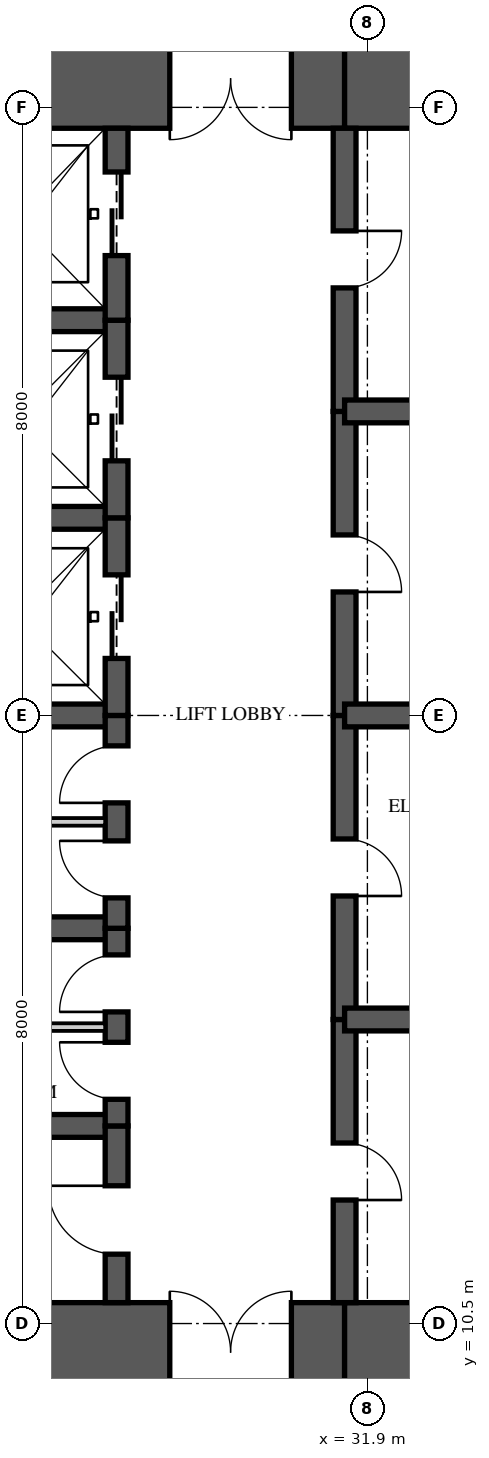
"""IFC4 building model, lengths in metres.
Left out: names, types, materials, properties, quantities, classifications, styles, units other than length and angle.
Written with IfcOpenShell. Run it as: python <this file> out.ifc"""

import sys

from ifc_helpers import new_model, si_unit, direction, frame, frame_2d, origin, place, context, subcontext, project, spatial, rectangle, extrude, element, fill, save


model = new_model("IFC4")
c1 = context("Model", 3, precision=1e-05, world=origin(), true_north=direction((0.0, 1.0)))
c2 = subcontext(c1, "Body", "Model", "MODEL_VIEW")
j1 = project(units=[si_unit("LENGTHUNIT", "METRE"), si_unit("PLANEANGLEUNIT", "RADIAN")], contexts=[c1])
p1 = place(None, origin())
s1 = spatial("IfcSite", under=j1, at=p1, CompositionType="ELEMENT")
p2 = place(p1, origin())
s2 = spatial("IfcBuilding", under=s1, at=p2, CompositionType="ELEMENT")
p3 = place(p2, frame((0.0, 0.0, 194.55)))
s3 = spatial("IfcBuildingStorey", under=s2, at=p3, CompositionType="ELEMENT", Elevation=194.55)
p4 = place(p3, frame((26.0, 10.125, 0.0), z_axis=(0.0, 0.0, 1.0), x_axis=(1.0, 0.0, 0.0)))
e1 = element("IfcWall", 1, at=p4, inside=s3, PredefinedType="SHEAR", context=c2, shape_type="SweptSolid", body=[
    extrude(rectangle(XDim=5.6, YDim=1.3, at=frame_2d((2.8, 0.0))), origin(), (0.0, 0.0, 1.0), 3.35),
])
p5 = place(p4, frame((3.3, 0.0, 0.0)))
e2 = element("IfcOpeningElement", 2, at=p5, cuts=e1, PredefinedType="OPENING", context=c2, shape_type="SweptSolid", body=[
    extrude(rectangle(XDim=1.6, YDim=2.1, at=frame_2d((0.8, 1.05))), frame((0.0, 0.66, 0.0), z_axis=(0.0, -1.0, 0.0), x_axis=(1.0, 0.0, 0.0)), (0.0, 0.0, 1.0), 1.32),
])
for number, where, z_axis, x_axis in (
    (3, (31.6, 10.125, 0.0), (0.0, 0.0, 1.0), (1.0, 0.0, 0.0)),
    (4, (35.9, 26.875, 0.0), (0.0, 0.0, 1.0), (-1.0, 0.0, 0.0)),
):
    element("IfcWall", number, at=place(p3, frame(where, z_axis=z_axis, x_axis=x_axis)), inside=s3, PredefinedType="SHEAR", context=c2, shape_type="SweptSolid", body=[
        extrude(rectangle(XDim=4.3, YDim=1.3, at=frame_2d((2.15, 0.0))), origin(), (0.0, 0.0, 1.0), 3.35),
    ])
p6 = place(p3, frame((31.6, 26.875, 0.0), z_axis=(0.0, 0.0, 1.0), x_axis=(-1.0, 0.0, 0.0)))
e5 = element("IfcWall", 5, at=p6, inside=s3, PredefinedType="SHEAR", context=c2, shape_type="SweptSolid", body=[
    extrude(rectangle(XDim=5.6, YDim=1.3, at=frame_2d((2.8, 0.0))), origin(), (0.0, 0.0, 1.0), 3.35),
])
p7 = place(p6, frame((0.7, 0.0, 0.0)))
e6 = element("IfcOpeningElement", 6, at=p7, cuts=e5, PredefinedType="OPENING", context=c2, shape_type="SweptSolid", body=[
    extrude(rectangle(XDim=1.6, YDim=2.1, at=frame_2d((0.8, 1.05))), frame((0.0, 0.66, 0.0), z_axis=(0.0, -1.0, 0.0), x_axis=(1.0, 0.0, 0.0)), (0.0, 0.0, 1.0), 1.32),
])
p8 = place(p3, frame((28.6, 10.775, 0.0), z_axis=(0.0, 0.0, 1.0), x_axis=(0.0, 1.0, 0.0)))
e7 = element("IfcWall", 7, at=p8, inside=s3, PredefinedType="SHEAR", context=c2, shape_type="SweptSolid", body=[
    extrude(rectangle(XDim=2.325, YDim=0.3, at=frame_2d((1.163, 0.0))), origin(), (0.0, 0.0, 1.0), 3.35),
])
p9 = place(p8, frame((0.637, 0.0, 0.0)))
e8 = element("IfcOpeningElement", 8, at=p9, cuts=e7, PredefinedType="OPENING", context=c2, shape_type="SweptSolid", body=[
    extrude(rectangle(XDim=0.9, YDim=2.1, at=frame_2d((0.45, 1.05))), frame((0.0, 0.16, 0.0), z_axis=(0.0, -1.0, 0.0), x_axis=(1.0, 0.0, 0.0)), (0.0, 0.0, 1.0), 0.32),
])
p10 = place(p3, frame((28.6, 13.1, 0.0), z_axis=(0.0, 0.0, 1.0), x_axis=(0.0, 1.0, 0.0)))
e9 = element("IfcWall", 9, at=p10, inside=s3, PredefinedType="SHEAR", context=c2, shape_type="SweptSolid", body=[
    extrude(rectangle(XDim=2.6, YDim=0.3, at=frame_2d((1.3, 0.0))), origin(), (0.0, 0.0, 1.0), 3.35),
])
p11 = place(p10, frame((0.35, 0.0, 0.0)))
e10 = element("IfcOpeningElement", 10, at=p11, cuts=e9, PredefinedType="OPENING", context=c2, shape_type="SweptSolid", body=[
    extrude(rectangle(XDim=0.75, YDim=2.1, at=frame_2d((0.375, 1.05))), frame((0.0, 0.16, 0.0), z_axis=(0.0, -1.0, 0.0), x_axis=(1.0, 0.0, 0.0)), (0.0, 0.0, 1.0), 0.32),
])
p12 = place(p10, frame((1.5, 0.0, 0.0)))
e11 = element("IfcOpeningElement", 11, at=p12, cuts=e9, PredefinedType="OPENING", context=c2, shape_type="SweptSolid", body=[
    extrude(rectangle(XDim=0.75, YDim=2.1, at=frame_2d((0.375, 1.05))), frame((0.0, 0.16, 0.0), z_axis=(0.0, -1.0, 0.0), x_axis=(1.0, 0.0, 0.0)), (0.0, 0.0, 1.0), 0.32),
])
p13 = place(p3, frame((28.6, 15.7, 0.0), z_axis=(0.0, 0.0, 1.0), x_axis=(0.0, 1.0, 0.0)))
e12 = element("IfcWall", 12, at=p13, inside=s3, PredefinedType="SHEAR", context=c2, shape_type="SweptSolid", body=[
    extrude(rectangle(XDim=2.8, YDim=0.3, at=frame_2d((1.4, 0.0))), origin(), (0.0, 0.0, 1.0), 3.35),
])
p14 = place(p13, frame((0.4, 0.0, 0.0)))
e13 = element("IfcOpeningElement", 13, at=p14, cuts=e12, PredefinedType="OPENING", context=c2, shape_type="SweptSolid", body=[
    extrude(rectangle(XDim=0.75, YDim=2.1, at=frame_2d((0.375, 1.05))), frame((0.0, 0.16, 0.0), z_axis=(0.0, -1.0, 0.0), x_axis=(1.0, 0.0, 0.0)), (0.0, 0.0, 1.0), 0.32),
])
p15 = place(p13, frame((1.65, 0.0, 0.0)))
e14 = element("IfcOpeningElement", 14, at=p15, cuts=e12, PredefinedType="OPENING", context=c2, shape_type="SweptSolid", body=[
    extrude(rectangle(XDim=0.75, YDim=2.1, at=frame_2d((0.375, 1.05))), frame((0.0, 0.16, 0.0), z_axis=(0.0, -1.0, 0.0), x_axis=(1.0, 0.0, 0.0)), (0.0, 0.0, 1.0), 0.32),
])
p16 = place(p3, frame((28.6, 18.5, 0.0), z_axis=(0.0, 0.0, 1.0), x_axis=(0.0, 1.0, 0.0)))
e15 = element("IfcWall", 15, at=p16, inside=s3, PredefinedType="SHEAR", context=c2, shape_type="SweptSolid", body=[
    extrude(rectangle(XDim=2.6, YDim=0.3, at=frame_2d((1.3, 0.0))), origin(), (0.0, 0.0, 1.0), 3.35),
])
p17 = place(p16, frame((0.75, 0.0, 0.0)))
e16 = element("IfcOpeningElement", 16, at=p17, cuts=e15, PredefinedType="OPENING", context=c2, shape_type="SweptSolid", body=[
    extrude(rectangle(XDim=1.1, YDim=2.1, at=frame_2d((0.55, 1.05))), frame((0.0, 0.16, 0.0), z_axis=(0.0, -1.0, 0.0), x_axis=(1.0, 0.0, 0.0)), (0.0, 0.0, 1.0), 0.32),
])
p18 = place(p3, frame((28.6, 21.1, 0.0), z_axis=(0.0, 0.0, 1.0), x_axis=(0.0, 1.0, 0.0)))
e17 = element("IfcWall", 17, at=p18, inside=s3, PredefinedType="SHEAR", context=c2, shape_type="SweptSolid", body=[
    extrude(rectangle(XDim=2.6, YDim=0.3, at=frame_2d((1.3, 0.0))), origin(), (0.0, 0.0, 1.0), 3.35),
])
p19 = place(p18, frame((0.75, 0.0, 0.0)))
e18 = element("IfcOpeningElement", 18, at=p19, cuts=e17, PredefinedType="OPENING", context=c2, shape_type="SweptSolid", body=[
    extrude(rectangle(XDim=1.1, YDim=2.1, at=frame_2d((0.55, 1.05))), frame((0.0, 0.16, 0.0), z_axis=(0.0, -1.0, 0.0), x_axis=(1.0, 0.0, 0.0)), (0.0, 0.0, 1.0), 0.32),
])
p20 = place(p3, frame((28.6, 23.7, 0.0), z_axis=(0.0, 0.0, 1.0), x_axis=(0.0, 1.0, 0.0)))
e19 = element("IfcWall", 19, at=p20, inside=s3, PredefinedType="SHEAR", context=c2, shape_type="SweptSolid", body=[
    extrude(rectangle(XDim=2.525, YDim=0.3, at=frame_2d((1.263, 0.0))), origin(), (0.0, 0.0, 1.0), 3.35),
])
p21 = place(p20, frame((0.85, 0.0, 0.0)))
e20 = element("IfcOpeningElement", 20, at=p21, cuts=e19, PredefinedType="OPENING", context=c2, shape_type="SweptSolid", body=[
    extrude(rectangle(XDim=1.1, YDim=2.1, at=frame_2d((0.55, 1.05))), frame((0.0, 0.16, 0.0), z_axis=(0.0, -1.0, 0.0), x_axis=(1.0, 0.0, 0.0)), (0.0, 0.0, 1.0), 0.32),
])
p22 = place(p3, frame((31.6, 10.775, 0.0), z_axis=(0.0, 0.0, 1.0), x_axis=(0.0, 1.0, 0.0)))
e21 = element("IfcWall", 21, at=p22, inside=s3, PredefinedType="SHEAR", context=c2, shape_type="SweptSolid", body=[
    extrude(rectangle(XDim=3.725, YDim=0.3, at=frame_2d((1.863, 0.0))), origin(), (0.0, 0.0, 1.0), 3.35),
])
p23 = place(p22, frame((1.35, 0.0, 0.0)))
e22 = element("IfcOpeningElement", 22, at=p23, cuts=e21, PredefinedType="OPENING", context=c2, shape_type="SweptSolid", body=[
    extrude(rectangle(XDim=0.75, YDim=2.1, at=frame_2d((0.375, 1.05))), frame((0.0, 0.16, 0.0), z_axis=(0.0, -1.0, 0.0), x_axis=(1.0, 0.0, 0.0)), (0.0, 0.0, 1.0), 0.32),
])
p24 = place(p3, frame((31.6, 14.5, 0.0), z_axis=(0.0, 0.0, 1.0), x_axis=(0.0, 1.0, 0.0)))
e23 = element("IfcWall", 23, at=p24, inside=s3, PredefinedType="SHEAR", context=c2, shape_type="SweptSolid", body=[
    extrude(rectangle(XDim=4.0, YDim=0.3, at=frame_2d((2.0, 0.0))), origin(), (0.0, 0.0, 1.0), 3.35),
])
p25 = place(p24, frame((1.625, 0.0, 0.0)))
e24 = element("IfcOpeningElement", 24, at=p25, cuts=e23, PredefinedType="OPENING", context=c2, shape_type="SweptSolid", body=[
    extrude(rectangle(XDim=0.75, YDim=2.1, at=frame_2d((0.375, 1.05))), frame((0.0, 0.16, 0.0), z_axis=(0.0, -1.0, 0.0), x_axis=(1.0, 0.0, 0.0)), (0.0, 0.0, 1.0), 0.32),
])
p26 = place(p3, frame((31.6, 18.5, 0.0), z_axis=(0.0, 0.0, 1.0), x_axis=(0.0, 1.0, 0.0)))
e25 = element("IfcWall", 25, at=p26, inside=s3, PredefinedType="SHEAR", context=c2, shape_type="SweptSolid", body=[
    extrude(rectangle(XDim=4.0, YDim=0.3, at=frame_2d((2.0, 0.0))), origin(), (0.0, 0.0, 1.0), 3.35),
])
p27 = place(p26, frame((1.625, 0.0, 0.0)))
e26 = element("IfcOpeningElement", 26, at=p27, cuts=e25, PredefinedType="OPENING", context=c2, shape_type="SweptSolid", body=[
    extrude(rectangle(XDim=0.75, YDim=2.1, at=frame_2d((0.375, 1.05))), frame((0.0, 0.16, 0.0), z_axis=(0.0, -1.0, 0.0), x_axis=(1.0, 0.0, 0.0)), (0.0, 0.0, 1.0), 0.32),
])
p28 = place(p3, frame((31.6, 22.5, 0.0), z_axis=(0.0, 0.0, 1.0), x_axis=(0.0, 1.0, 0.0)))
e27 = element("IfcWall", 27, at=p28, inside=s3, PredefinedType="SHEAR", context=c2, shape_type="SweptSolid", body=[
    extrude(rectangle(XDim=3.725, YDim=0.3, at=frame_2d((1.863, 0.0))), origin(), (0.0, 0.0, 1.0), 3.35),
])
p29 = place(p28, frame((1.625, 0.0, 0.0)))
e28 = element("IfcOpeningElement", 28, at=p29, cuts=e27, PredefinedType="OPENING", context=c2, shape_type="SweptSolid", body=[
    extrude(rectangle(XDim=0.75, YDim=2.1, at=frame_2d((0.375, 1.05))), frame((0.0, 0.16, 0.0), z_axis=(0.0, -1.0, 0.0), x_axis=(1.0, 0.0, 0.0)), (0.0, 0.0, 1.0), 0.32),
])
for number, where, z_axis, x_axis in (
    (29, (26.0, 13.1, 0.0), (0.0, 0.0, 1.0), (1.0, 0.0, 0.0)),
    (30, (26.0, 15.7, 0.0), (0.0, 0.0, 1.0), (1.0, 0.0, 0.0)),
    (31, (26.0, 18.5, 0.0), (0.0, 0.0, 1.0), (1.0, 0.0, 0.0)),
    (32, (26.0, 21.1, 0.0), (0.0, 0.0, 1.0), (1.0, 0.0, 0.0)),
    (33, (26.0, 23.7, 0.0), (0.0, 0.0, 1.0), (1.0, 0.0, 0.0)),
):
    element("IfcWall", number, at=place(p3, frame(where, z_axis=z_axis, x_axis=x_axis)), inside=s3, PredefinedType="SHEAR", context=c2, shape_type="SweptSolid", body=[
        extrude(rectangle(XDim=2.6, YDim=0.3, at=frame_2d((1.3, 0.0))), origin(), (0.0, 0.0, 1.0), 3.35),
    ])
for number, where, z_axis, x_axis in (
    (34, (31.6, 14.5, 0.0), (0.0, 0.0, 1.0), (1.0, 0.0, 0.0)),
    (35, (31.6, 18.5, 0.0), (0.0, 0.0, 1.0), (1.0, 0.0, 0.0)),
    (36, (31.6, 22.5, 0.0), (0.0, 0.0, 1.0), (1.0, 0.0, 0.0)),
):
    element("IfcWall", number, at=place(p3, frame(where, z_axis=z_axis, x_axis=x_axis)), inside=s3, PredefinedType="SHEAR", context=c2, shape_type="SweptSolid", body=[
        extrude(rectangle(XDim=4.3, YDim=0.3, at=frame_2d((2.15, 0.0))), origin(), (0.0, 0.0, 1.0), 3.35),
    ])
for number, where, z_axis, x_axis in (
    (37, (26.15, 14.4, 0.0), (0.0, 0.0, 1.0), (1.0, 0.0, 0.0)),
    (38, (26.15, 17.1, 0.0), (0.0, 0.0, 1.0), (1.0, 0.0, 0.0)),
):
    element("IfcWall", number, at=place(p3, frame(where, z_axis=z_axis, x_axis=x_axis)), inside=s3, PredefinedType="PARTITIONING", context=c2, shape_type="SweptSolid", body=[
        extrude(rectangle(XDim=2.3, YDim=0.1, at=frame_2d((1.15, 0.0))), origin(), (0.0, 0.0, 1.0), 3.11),
    ])
p30 = place(p17, origin())
e39 = element("IfcDoor", 39, at=p30, inside=s3, OperationType="SLIDING_TO_LEFT", PredefinedType="DOOR", context=c2, shape_type="SweptSolid", body=[
    extrude(rectangle(XDim=1.1, YDim=2.1, at=frame_2d((0.55, 1.05))), frame((0.0, 0.025, 0.0), z_axis=(0.0, -1.0, 0.0), x_axis=(1.0, 0.0, 0.0)), (0.0, 0.0, 1.0), 0.05),
])
fill(e16, e39)
p31 = place(p19, origin())
e40 = element("IfcDoor", 40, at=p31, inside=s3, OperationType="SLIDING_TO_LEFT", PredefinedType="DOOR", context=c2, shape_type="SweptSolid", body=[
    extrude(rectangle(XDim=1.1, YDim=2.1, at=frame_2d((0.55, 1.05))), frame((0.0, 0.025, 0.0), z_axis=(0.0, -1.0, 0.0), x_axis=(1.0, 0.0, 0.0)), (0.0, 0.0, 1.0), 0.05),
])
fill(e18, e40)
p32 = place(p21, origin())
e41 = element("IfcDoor", 41, at=p32, inside=s3, OperationType="SLIDING_TO_LEFT", PredefinedType="DOOR", context=c2, shape_type="SweptSolid", body=[
    extrude(rectangle(XDim=1.1, YDim=2.1, at=frame_2d((0.55, 1.05))), frame((0.0, 0.025, 0.0), z_axis=(0.0, -1.0, 0.0), x_axis=(1.0, 0.0, 0.0)), (0.0, 0.0, 1.0), 0.05),
])
fill(e20, e41)
p33 = place(p9, origin())
e42 = element("IfcDoor", 42, at=p33, inside=s3, OperationType="SINGLE_SWING_RIGHT", PredefinedType="DOOR", context=c2, shape_type="SweptSolid", body=[
    extrude(rectangle(XDim=0.9, YDim=2.1, at=frame_2d((0.45, 1.05))), frame((0.0, 0.025, 0.0), z_axis=(0.0, -1.0, 0.0), x_axis=(1.0, 0.0, 0.0)), (0.0, 0.0, 1.0), 0.05),
])
fill(e8, e42)
p34 = place(p11, origin())
e43 = element("IfcDoor", 43, at=p34, inside=s3, OperationType="SINGLE_SWING_RIGHT", PredefinedType="DOOR", context=c2, shape_type="SweptSolid", body=[
    extrude(rectangle(XDim=0.75, YDim=2.1, at=frame_2d((0.375, 1.05))), frame((0.0, 0.025, 0.0), z_axis=(0.0, -1.0, 0.0), x_axis=(1.0, 0.0, 0.0)), (0.0, 0.0, 1.0), 0.05),
])
fill(e10, e43)
p35 = place(p12, origin())
e44 = element("IfcDoor", 44, at=p35, inside=s3, OperationType="SINGLE_SWING_LEFT", PredefinedType="DOOR", context=c2, shape_type="SweptSolid", body=[
    extrude(rectangle(XDim=0.75, YDim=2.1, at=frame_2d((0.375, 1.05))), frame((0.0, 0.025, 0.0), z_axis=(0.0, -1.0, 0.0), x_axis=(1.0, 0.0, 0.0)), (0.0, 0.0, 1.0), 0.05),
])
fill(e11, e44)
p36 = place(p14, origin())
e45 = element("IfcDoor", 45, at=p36, inside=s3, OperationType="SINGLE_SWING_RIGHT", PredefinedType="DOOR", context=c2, shape_type="SweptSolid", body=[
    extrude(rectangle(XDim=0.75, YDim=2.1, at=frame_2d((0.375, 1.05))), frame((0.0, 0.025, 0.0), z_axis=(0.0, -1.0, 0.0), x_axis=(1.0, 0.0, 0.0)), (0.0, 0.0, 1.0), 0.05),
])
fill(e13, e45)
p37 = place(p15, origin())
e46 = element("IfcDoor", 46, at=p37, inside=s3, OperationType="SINGLE_SWING_LEFT", PredefinedType="DOOR", context=c2, shape_type="SweptSolid", body=[
    extrude(rectangle(XDim=0.75, YDim=2.1, at=frame_2d((0.375, 1.05))), frame((0.0, 0.025, 0.0), z_axis=(0.0, -1.0, 0.0), x_axis=(1.0, 0.0, 0.0)), (0.0, 0.0, 1.0), 0.05),
])
fill(e14, e46)
p38 = place(p5, origin())
e47 = element("IfcDoor", 47, at=p38, inside=s3, OperationType="DOUBLE_DOOR_SINGLE_SWING", PredefinedType="DOOR", context=c2, shape_type="SweptSolid", body=[
    extrude(rectangle(XDim=1.6, YDim=2.1, at=frame_2d((0.8, 1.05))), frame((0.0, 0.025, 0.0), z_axis=(0.0, -1.0, 0.0), x_axis=(1.0, 0.0, 0.0)), (0.0, 0.0, 1.0), 0.05),
])
fill(e2, e47)
p39 = place(p7, origin())
e48 = element("IfcDoor", 48, at=p39, inside=s3, OperationType="DOUBLE_DOOR_SINGLE_SWING", PredefinedType="DOOR", context=c2, shape_type="SweptSolid", body=[
    extrude(rectangle(XDim=1.6, YDim=2.1, at=frame_2d((0.8, 1.05))), frame((0.0, 0.025, 0.0), z_axis=(0.0, -1.0, 0.0), x_axis=(1.0, 0.0, 0.0)), (0.0, 0.0, 1.0), 0.05),
])
fill(e6, e48)
p40 = place(p23, frame((0.75, 0.0, 0.0), z_axis=(0.0, 0.0, 1.0), x_axis=(-1.0, 0.0, 0.0)))
e49 = element("IfcDoor", 49, at=p40, inside=s3, OperationType="SINGLE_SWING_RIGHT", PredefinedType="DOOR", context=c2, shape_type="SweptSolid", body=[
    extrude(rectangle(XDim=0.75, YDim=2.1, at=frame_2d((0.375, 1.05))), frame((0.0, 0.025, 0.0), z_axis=(0.0, -1.0, 0.0), x_axis=(1.0, 0.0, 0.0)), (0.0, 0.0, 1.0), 0.05),
])
fill(e22, e49)
p41 = place(p25, frame((0.75, 0.0, 0.0), z_axis=(0.0, 0.0, 1.0), x_axis=(-1.0, 0.0, 0.0)))
e50 = element("IfcDoor", 50, at=p41, inside=s3, OperationType="SINGLE_SWING_RIGHT", PredefinedType="DOOR", context=c2, shape_type="SweptSolid", body=[
    extrude(rectangle(XDim=0.75, YDim=2.1, at=frame_2d((0.375, 1.05))), frame((0.0, 0.025, 0.0), z_axis=(0.0, -1.0, 0.0), x_axis=(1.0, 0.0, 0.0)), (0.0, 0.0, 1.0), 0.05),
])
fill(e24, e50)
p42 = place(p27, frame((0.75, 0.0, 0.0), z_axis=(0.0, 0.0, 1.0), x_axis=(-1.0, 0.0, 0.0)))
e51 = element("IfcDoor", 51, at=p42, inside=s3, OperationType="SINGLE_SWING_RIGHT", PredefinedType="DOOR", context=c2, shape_type="SweptSolid", body=[
    extrude(rectangle(XDim=0.75, YDim=2.1, at=frame_2d((0.375, 1.05))), frame((0.0, 0.025, 0.0), z_axis=(0.0, -1.0, 0.0), x_axis=(1.0, 0.0, 0.0)), (0.0, 0.0, 1.0), 0.05),
])
fill(e26, e51)
p43 = place(p29, frame((0.75, 0.0, 0.0), z_axis=(0.0, 0.0, 1.0), x_axis=(-1.0, 0.0, 0.0)))
e52 = element("IfcDoor", 52, at=p43, inside=s3, OperationType="SINGLE_SWING_LEFT", PredefinedType="DOOR", context=c2, shape_type="SweptSolid", body=[
    extrude(rectangle(XDim=0.75, YDim=2.1, at=frame_2d((0.375, 1.05))), frame((0.0, 0.025, 0.0), z_axis=(0.0, -1.0, 0.0), x_axis=(1.0, 0.0, 0.0)), (0.0, 0.0, 1.0), 0.05),
])
fill(e28, e52)
save(model, sys.argv[1])
